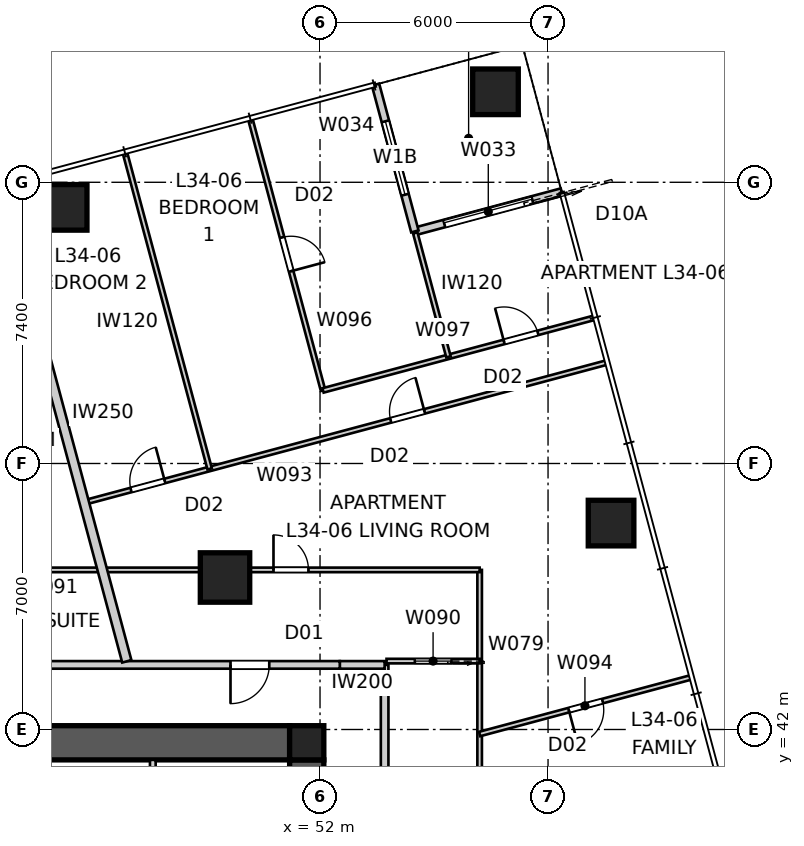
"""IFC4 building model, lengths in metres.
Left out: names, types, materials, properties, quantities, classifications, styles, units other than length and angle.
Written with IfcOpenShell. Run it as: python <this file> out.ifc"""

import sys

from ifc_helpers import new_model, si_unit, direction, frame, frame_2d, origin, origin_2d, place, context, subcontext, project, spatial, polyline, rectangle, outline, extrude, element, fill, save


model = new_model("IFC4")
c1 = context("Model", 3, precision=1e-05, world=origin(), true_north=direction((0.0, 1.0)))
c2 = subcontext(c1, "Body", "Model", "MODEL_VIEW")
j1 = project(units=[si_unit("LENGTHUNIT", "METRE"), si_unit("PLANEANGLEUNIT", "RADIAN")], contexts=[c1])
p1 = place(None, origin())
s1 = spatial("IfcSite", under=j1, at=p1, CompositionType="ELEMENT")
p2 = place(p1, origin())
s2 = spatial("IfcBuilding", under=s1, at=p2, CompositionType="ELEMENT")
p3 = place(p2, frame((0.0, 0.0, 125.2)))
s3 = spatial("IfcBuildingStorey", under=s2, at=p3, CompositionType="ELEMENT", Elevation=125.2)
p4 = place(p3, frame((28.8, 41.65, 0.0), z_axis=(0.0, 0.0, 1.0), x_axis=(1.0, 0.0, 0.0)))
e1 = element("IfcWall", 1, at=p4, inside=s3, PredefinedType="SHEAR", context=c2, shape_type="SweptSolid", body=[
    extrude(outline(polyline([(0.0, -0.45), (22.4, -0.45), (22.4, -0.025), (22.85, -0.025), (22.85, 0.025), (22.4, 0.025), (22.4, 0.45), (0.0, 0.45), (0.0, 0.025), (-0.45, 0.025), (-0.45, -0.025), (0.0, -0.025), (0.0, -0.45)])), origin(), (0.0, 0.0, 1.0), 3.4),
])
p5 = place(p3, frame((51.65, 18.8, 0.0), z_axis=(0.0, 0.0, 1.0), x_axis=(0.0, 1.0, 0.0)))
e2 = element("IfcWall", 2, at=p5, inside=s3, PredefinedType="SHEAR", context=c2, shape_type="SweptSolid", body=[
    extrude(outline(polyline([(0.0, -0.45), (22.4, -0.45), (22.4, -0.025), (22.85, -0.025), (22.85, 0.025), (22.4, 0.025), (22.4, 0.45), (0.0, 0.45), (0.0, 0.025), (-0.45, 0.025), (-0.45, -0.025), (0.0, -0.025), (0.0, -0.45)])), origin(), (0.0, 0.0, 1.0), 3.4),
])
p6 = place(p5, frame((11.14, 0.0, 0.0)))
e3 = element("IfcOpeningElement", 3, at=p6, cuts=e2, PredefinedType="OPENING", context=c2, shape_type="SweptSolid", body=[
    extrude(rectangle(XDim=1.02, YDim=2.4, at=frame_2d((0.51, 1.2))), frame((0.0, 0.46, 0.0), z_axis=(0.0, -1.0, 0.0), x_axis=(1.0, 0.0, 0.0)), (0.0, 0.0, 1.0), 0.92),
])
p7 = place(p3, frame((51.65, 41.65, 0.0), z_axis=(0.0, 0.0, 1.0), x_axis=(1.0, 0.0, 0.0)))
e4 = element("IfcColumn", 4, at=p7, inside=s3, PredefinedType="COLUMN", context=c2, shape_type="SweptSolid", body=[
    extrude(rectangle(XDim=0.9, YDim=0.9, at=origin_2d()), origin(), (0.0, 0.0, 1.0), 3.4),
])
for number, where, z_axis, x_axis in (
    (5, (59.658, 47.432, 0.0), (0.0, 0.0, 1.0), (1.0, 0.0, 0.0)),
    (6, (56.617, 58.781, 0.0), (0.0, 0.0, 1.0), (1.0, 0.0, 0.0)),
    (7, (45.267, 55.74, 0.0), (0.0, 0.0, 1.0), (1.0, 0.0, 0.0)),
):
    element("IfcColumn", number, at=place(p3, frame(where, z_axis=z_axis, x_axis=x_axis)), inside=s3, PredefinedType="COLUMN", context=c2, shape_type="SweptSolid", body=[
        extrude(rectangle(XDim=1.2, YDim=1.2, at=origin_2d()), origin(), (0.0, 0.0, 1.0), 3.4),
    ])
p8 = place(p3, frame((49.5, 46.0, 0.0), z_axis=(0.0, 0.0, 1.0), x_axis=(1.0, 0.0, 0.0)))
e8 = element("IfcColumn", 8, at=p8, inside=s3, PredefinedType="COLUMN", context=c2, shape_type="SweptSolid", body=[
    extrude(rectangle(XDim=1.3, YDim=1.3, at=origin_2d()), origin(), (0.0, 0.0, 1.0), 3.4),
])
p9 = place(p3, frame((58.359, 56.143, 0.0), z_axis=(0.0, 0.0, 1.0), x_axis=(-0.965919172068, -0.258843877716, 0.0)))
e9 = element("IfcWall", 9, at=p9, inside=s3, PredefinedType="SOLIDWALL", context=c2, shape_type="SweptSolid", body=[
    extrude(rectangle(XDim=4.0, YDim=0.2, at=frame_2d((2.0, 0.0))), origin(), (0.0, 0.0, 1.0), 3.25),
])
p10 = place(p9, frame((0.8, 0.0, 0.0)))
e10 = element("IfcOpeningElement", 10, at=p10, cuts=e9, PredefinedType="OPENING", context=c2, shape_type="SweptSolid", body=[
    extrude(rectangle(XDim=2.4, YDim=2.1, at=frame_2d((1.2, 1.05))), frame((0.0, 0.11, 0.0), z_axis=(0.0, -1.0, 0.0), x_axis=(1.0, 0.0, 0.0)), (0.0, 0.0, 1.0), 0.22),
])
p11 = place(p3, frame((54.496, 55.107, 0.0), z_axis=(0.0, 0.0, 1.0), x_axis=(-0.258786931944, 0.965934430412, 0.0)))
e11 = element("IfcWall", 11, at=p11, inside=s3, PredefinedType="SOLIDWALL", context=c2, shape_type="SweptSolid", body=[
    extrude(rectangle(XDim=4.0, YDim=0.2, at=frame_2d((2.0, 0.0))), origin(), (0.0, 0.0, 1.0), 3.25),
])
p12 = place(p11, frame((1.0, 0.0, 0.45)))
e12 = element("IfcOpeningElement", 12, at=p12, cuts=e11, PredefinedType="OPENING", context=c2, shape_type="SweptSolid", body=[
    extrude(rectangle(XDim=2.0, YDim=1.8, at=frame_2d((1.0, 0.9))), frame((0.0, 0.11, 0.0), z_axis=(0.0, -1.0, 0.0), x_axis=(1.0, 0.0, 0.0)), (0.0, 0.0, 1.0), 0.22),
])
p13 = place(p3, frame((53.7, 17.48, 0.0), z_axis=(0.0, 0.0, 1.0), x_axis=(0.0, 1.0, 0.0)))
e13 = element("IfcWall", 13, at=p13, inside=s3, PredefinedType="PARTITIONING", context=c2, shape_type="SweptSolid", body=[
    extrude(rectangle(XDim=26.22, YDim=0.2, at=frame_2d((13.11, 0.0))), origin(), (0.0, 0.0, 1.0), 3.25),
])
p14 = place(p13, frame((2.252, 0.0, 0.0)))
e14 = element("IfcOpeningElement", 14, at=p14, cuts=e13, PredefinedType="OPENING", context=c2, shape_type="SweptSolid", body=[
    extrude(rectangle(XDim=1.02, YDim=2.34, at=frame_2d((0.51, 1.17))), frame((0.0, 0.11, 0.0), z_axis=(0.0, -1.0, 0.0), x_axis=(1.0, 0.0, 0.0)), (0.0, 0.0, 1.0), 0.22),
])
p15 = place(p13, frame((7.328, 0.0, 0.0)))
e15 = element("IfcOpeningElement", 15, at=p15, cuts=e13, PredefinedType="OPENING", context=c2, shape_type="SweptSolid", body=[
    extrude(rectangle(XDim=1.02, YDim=2.34, at=frame_2d((0.51, 1.17))), frame((0.0, 0.11, 0.0), z_axis=(0.0, -1.0, 0.0), x_axis=(1.0, 0.0, 0.0)), (0.0, 0.0, 1.0), 0.22),
])
p16 = place(p3, frame((53.7, 43.7, 0.0), z_axis=(0.0, 0.0, 1.0), x_axis=(-1.0, 0.0, 0.0)))
e16 = element("IfcWall", 16, at=p16, inside=s3, PredefinedType="PARTITIONING", context=c2, shape_type="SweptSolid", body=[
    extrude(rectangle(XDim=1.18, YDim=0.2, at=frame_2d((0.59, 0.0))), origin(), (0.0, 0.0, 1.0), 2.722),
])
p17 = place(p3, frame((52.52, 43.7, 0.0), z_axis=(0.0, 0.0, 1.0), x_axis=(-1.0, 0.0, 0.0)))
e17 = element("IfcWall", 17, at=p17, inside=s3, PredefinedType="PARTITIONING", context=c2, shape_type="SweptSolid", body=[
    extrude(rectangle(XDim=27.02, YDim=0.2, at=frame_2d((13.51, 0.0))), origin(), (0.0, 0.0, 1.0), 3.25),
])
p18 = place(p17, frame((22.208, 0.0, 0.0)))
e18 = element("IfcOpeningElement", 18, at=p18, cuts=e17, PredefinedType="OPENING", context=c2, shape_type="SweptSolid", body=[
    extrude(rectangle(XDim=1.02, YDim=2.34, at=frame_2d((0.51, 1.17))), frame((0.0, 0.11, 0.0), z_axis=(0.0, -1.0, 0.0), x_axis=(1.0, 0.0, 0.0)), (0.0, 0.0, 1.0), 0.22),
])
p19 = place(p17, frame((1.856, 0.0, 0.0)))
e19 = element("IfcOpeningElement", 19, at=p19, cuts=e17, PredefinedType="OPENING", context=c2, shape_type="SweptSolid", body=[
    extrude(rectangle(XDim=1.02, YDim=2.34, at=frame_2d((0.51, 1.17))), frame((0.0, 0.11, 0.0), z_axis=(0.0, -1.0, 0.0), x_axis=(1.0, 0.0, 0.0)), (0.0, 0.0, 1.0), 0.22),
])
p20 = place(p3, frame((43.56, 56.318, 0.0), z_axis=(0.0, 0.0, 1.0), x_axis=(0.258822671559, -0.965924854576, 0.0)))
e20 = element("IfcWall", 20, at=p20, inside=s3, PredefinedType="PARTITIONING", context=c2, shape_type="SweptSolid", body=[
    extrude(rectangle(XDim=12.966, YDim=0.25, at=frame_2d((6.483, 0.0))), origin(), (0.0, 0.0, 1.0), 3.25),
])
p21 = place(p3, frame((47.6, 41.2, 0.0), z_axis=(0.0, 0.0, 1.0), x_axis=(0.0, -1.0, 0.0)))
e21 = element("IfcWall", 21, at=p21, inside=s3, PredefinedType="SOLIDWALL", context=c2, shape_type="SweptSolid", body=[
    extrude(rectangle(XDim=5.9, YDim=0.15, at=frame_2d((2.95, 0.0))), origin(), (0.0, 0.0, 1.0), 3.25),
])
p22 = place(p3, frame((56.2, 46.2, 0.0), z_axis=(0.0, 0.0, 1.0), x_axis=(0.0, -1.0, 0.0)))
e22 = element("IfcWall", 22, at=p22, inside=s3, PredefinedType="PARTITIONING", context=c2, shape_type="SweptSolid", body=[
    extrude(rectangle(XDim=33.2, YDim=0.12, at=frame_2d((16.6, 0.0))), origin(), (0.0, 0.0, 1.0), 2.55),
])
p23 = place(p22, frame((23.955, 0.0, 0.0)))
e23 = element("IfcOpeningElement", 23, at=p23, cuts=e22, PredefinedType="OPENING", context=c2, shape_type="SweptSolid", body=[
    extrude(rectangle(XDim=0.92, YDim=2.34, at=frame_2d((0.46, 1.17))), frame((0.0, 0.07, 0.0), z_axis=(0.0, -1.0, 0.0), x_axis=(1.0, 0.0, 0.0)), (0.0, 0.0, 1.0), 0.14),
])
p24 = place(p22, frame((20.966, 0.0, 0.0)))
e24 = element("IfcOpeningElement", 24, at=p24, cuts=e22, PredefinedType="OPENING", context=c2, shape_type="SweptSolid", body=[
    extrude(rectangle(XDim=0.92, YDim=2.34, at=frame_2d((0.46, 1.17))), frame((0.0, 0.07, 0.0), z_axis=(0.0, -1.0, 0.0), x_axis=(1.0, 0.0, 0.0)), (0.0, 0.0, 1.0), 0.14),
])
p25 = place(p22, frame((13.174, 0.0, 0.0)))
e25 = element("IfcOpeningElement", 25, at=p25, cuts=e22, PredefinedType="OPENING", context=c2, shape_type="SweptSolid", body=[
    extrude(rectangle(XDim=0.96, YDim=2.1, at=frame_2d((0.48, 1.05))), frame((0.0, 0.07, 0.0), z_axis=(0.0, -1.0, 0.0), x_axis=(1.0, 0.0, 0.0)), (0.0, 0.0, 1.0), 0.14),
])
p26 = place(p3, frame((56.2, 43.8, 0.0), z_axis=(0.0, 0.0, 1.0), x_axis=(-1.0, 0.0, 0.0)))
e26 = element("IfcWall", 26, at=p26, inside=s3, PredefinedType="PARTITIONING", context=c2, shape_type="SweptSolid", body=[
    extrude(rectangle(XDim=2.45, YDim=0.12, at=frame_2d((1.225, 0.0))), origin(), (0.0, 0.0, 1.0), 2.722),
])
p27 = place(p26, frame((0.745, 0.0, 0.0)))
e27 = element("IfcOpeningElement", 27, at=p27, cuts=e26, PredefinedType="OPENING", context=c2, shape_type="SweptSolid", body=[
    extrude(rectangle(XDim=0.96, YDim=2.1, at=frame_2d((0.48, 1.05))), frame((0.0, 0.07, 0.0), z_axis=(0.0, -1.0, 0.0), x_axis=(1.0, 0.0, 0.0)), (0.0, 0.0, 1.0), 0.14),
])
p28 = place(p3, frame((23.0, 46.2, 0.0), z_axis=(0.0, 0.0, 1.0), x_axis=(1.0, 0.0, 0.0)))
e28 = element("IfcWall", 28, at=p28, inside=s3, PredefinedType="PARTITIONING", context=c2, shape_type="SweptSolid", body=[
    extrude(rectangle(XDim=33.2, YDim=0.12, at=frame_2d((16.6, 0.0))), origin(), (0.0, 0.0, 1.0), 2.55),
])
p29 = place(p28, frame((5.844, 0.0, 0.0)))
e29 = element("IfcOpeningElement", 29, at=p29, cuts=e28, PredefinedType="OPENING", context=c2, shape_type="SweptSolid", body=[
    extrude(rectangle(XDim=0.92, YDim=2.34, at=frame_2d((0.46, 1.17))), frame((0.0, 0.07, 0.0), z_axis=(0.0, -1.0, 0.0), x_axis=(1.0, 0.0, 0.0)), (0.0, 0.0, 1.0), 0.14),
])
p30 = place(p28, frame((3.382, 0.0, 0.0)))
e30 = element("IfcOpeningElement", 30, at=p30, cuts=e28, PredefinedType="OPENING", context=c2, shape_type="SweptSolid", body=[
    extrude(rectangle(XDim=0.92, YDim=2.34, at=frame_2d((0.46, 1.17))), frame((0.0, 0.07, 0.0), z_axis=(0.0, -1.0, 0.0), x_axis=(1.0, 0.0, 0.0)), (0.0, 0.0, 1.0), 0.14),
])
p31 = place(p28, frame((9.452, 0.0, 0.0)))
e31 = element("IfcOpeningElement", 31, at=p31, cuts=e28, PredefinedType="OPENING", context=c2, shape_type="SweptSolid", body=[
    extrude(rectangle(XDim=0.92, YDim=2.34, at=frame_2d((0.46, 1.17))), frame((0.0, 0.07, 0.0), z_axis=(0.0, -1.0, 0.0), x_axis=(1.0, 0.0, 0.0)), (0.0, 0.0, 1.0), 0.14),
])
p32 = place(p28, frame((27.775, 0.0, 0.0)))
e32 = element("IfcOpeningElement", 32, at=p32, cuts=e28, PredefinedType="OPENING", context=c2, shape_type="SweptSolid", body=[
    extrude(rectangle(XDim=0.92, YDim=2.34, at=frame_2d((0.46, 1.17))), frame((0.0, 0.07, 0.0), z_axis=(0.0, -1.0, 0.0), x_axis=(1.0, 0.0, 0.0)), (0.0, 0.0, 1.0), 0.14),
])
p33 = place(p28, frame((15.05, 0.0, 0.0)))
e33 = element("IfcOpeningElement", 33, at=p33, cuts=e28, PredefinedType="OPENING", context=c2, shape_type="SweptSolid", body=[
    extrude(rectangle(XDim=0.96, YDim=2.1, at=frame_2d((0.48, 1.05))), frame((0.0, 0.07, 0.0), z_axis=(0.0, -1.0, 0.0), x_axis=(1.0, 0.0, 0.0)), (0.0, 0.0, 1.0), 0.14),
])
p34 = place(p3, frame((45.796, 47.973, 0.0), z_axis=(0.0, 0.0, 1.0), x_axis=(0.965921975889, 0.258833414564, 0.0)))
e34 = element("IfcWall", 34, at=p34, inside=s3, PredefinedType="PARTITIONING", context=c2, shape_type="SweptSolid", body=[
    extrude(rectangle(XDim=14.21, YDim=0.12, at=frame_2d((7.105, 0.0))), origin(), (0.0, 0.0, 1.0), 3.25),
])
p35 = place(p34, frame((8.348, 0.0, 0.0)))
e35 = element("IfcOpeningElement", 35, at=p35, cuts=e34, PredefinedType="OPENING", context=c2, shape_type="SweptSolid", body=[
    extrude(rectangle(XDim=0.92, YDim=2.34, at=frame_2d((0.46, 1.17))), frame((0.0, 0.07, 0.0), z_axis=(0.0, -1.0, 0.0), x_axis=(1.0, 0.0, 0.0)), (0.0, 0.0, 1.0), 0.14),
])
p36 = place(p34, frame((1.273, 0.0, 0.0)))
e36 = element("IfcOpeningElement", 36, at=p36, cuts=e34, PredefinedType="OPENING", context=c2, shape_type="SweptSolid", body=[
    extrude(rectangle(XDim=0.92, YDim=2.34, at=frame_2d((0.46, 1.17))), frame((0.0, 0.07, 0.0), z_axis=(0.0, -1.0, 0.0), x_axis=(1.0, 0.0, 0.0)), (0.0, 0.0, 1.0), 0.14),
])
p37 = place(p3, frame((61.741, 43.366, 0.0), z_axis=(0.0, 0.0, 1.0), x_axis=(-0.965924876974, -0.25882258797, 0.0)))
e37 = element("IfcWall", 37, at=p37, inside=s3, PredefinedType="PARTITIONING", context=c2, shape_type="SweptSolid", body=[
    extrude(rectangle(XDim=5.737, YDim=0.12, at=frame_2d((2.869, 0.0))), origin(), (0.0, 0.0, 1.0), 3.25),
])
p38 = place(p37, frame((2.388, 0.0, 0.0)))
e38 = element("IfcOpeningElement", 38, at=p38, cuts=e37, PredefinedType="OPENING", context=c2, shape_type="SweptSolid", body=[
    extrude(rectangle(XDim=0.92, YDim=2.34, at=frame_2d((0.46, 1.17))), frame((0.0, 0.07, 0.0), z_axis=(0.0, -1.0, 0.0), x_axis=(1.0, 0.0, 0.0)), (0.0, 0.0, 1.0), 0.14),
])
p39 = place(p3, frame((49.096, 48.857, 0.0), z_axis=(0.0, 0.0, 1.0), x_axis=(-0.258800415469, 0.965930817892, 0.0)))
e39 = element("IfcWall", 39, at=p39, inside=s3, PredefinedType="PARTITIONING", context=c2, shape_type="SweptSolid", body=[
    extrude(rectangle(XDim=8.6, YDim=0.12, at=frame_2d((4.3, 0.0))), origin(), (0.0, 0.0, 1.0), 2.722),
])
p40 = place(p3, frame((50.17, 58.048, 0.0), z_axis=(0.0, 0.0, 1.0), x_axis=(0.258807770359, -0.965928847277, 0.0)))
e40 = element("IfcWall", 40, at=p40, inside=s3, PredefinedType="PARTITIONING", context=c2, shape_type="SweptSolid", body=[
    extrude(rectangle(XDim=7.377, YDim=0.12, at=frame_2d((3.688, 0.0))), origin(), (0.0, 0.0, 1.0), 3.25),
])
p41 = place(p40, frame((3.208, 0.0, 0.0)))
e41 = element("IfcOpeningElement", 41, at=p41, cuts=e40, PredefinedType="OPENING", context=c2, shape_type="SweptSolid", body=[
    extrude(rectangle(XDim=0.92, YDim=2.34, at=frame_2d((0.46, 1.17))), frame((0.0, 0.07, 0.0), z_axis=(0.0, -1.0, 0.0), x_axis=(1.0, 0.0, 0.0)), (0.0, 0.0, 1.0), 0.14),
])
p42 = place(p3, frame((52.08, 50.923, 0.0), z_axis=(0.0, 0.0, 1.0), x_axis=(0.965920573283, 0.258838648792, 0.0)))
e42 = element("IfcWall", 42, at=p42, inside=s3, PredefinedType="PARTITIONING", context=c2, shape_type="SweptSolid", body=[
    extrude(rectangle(XDim=7.377, YDim=0.12, at=frame_2d((3.688, 0.0))), origin(), (0.0, 0.0, 1.0), 3.25),
])
p43 = place(p42, frame((4.932, 0.0, 0.0)))
e43 = element("IfcOpeningElement", 43, at=p43, cuts=e42, PredefinedType="OPENING", context=c2, shape_type="SweptSolid", body=[
    extrude(rectangle(XDim=0.92, YDim=2.34, at=frame_2d((0.46, 1.17))), frame((0.0, 0.07, 0.0), z_axis=(0.0, -1.0, 0.0), x_axis=(1.0, 0.0, 0.0)), (0.0, 0.0, 1.0), 0.14),
])
p44 = place(p3, frame((54.506, 55.069, 0.0), z_axis=(0.0, 0.0, 1.0), x_axis=(0.258783069815, -0.96593546512, 0.0)))
e44 = element("IfcWall", 44, at=p44, inside=s3, PredefinedType="PARTITIONING", context=c2, shape_type="SweptSolid", body=[
    extrude(rectangle(XDim=3.376, YDim=0.12, at=frame_2d((1.688, 0.0))), origin(), (0.0, 0.0, 1.0), 3.25),
])
p45 = place(p10, origin())
e45 = element("IfcDoor", 45, at=p45, inside=s3, OperationType="SLIDING_TO_LEFT", PredefinedType="DOOR", context=c2, shape_type="SweptSolid", body=[
    extrude(rectangle(XDim=2.4, YDim=2.1, at=frame_2d((1.2, 1.05))), frame((0.0, 0.025, 0.0), z_axis=(0.0, -1.0, 0.0), x_axis=(1.0, 0.0, 0.0)), (0.0, 0.0, 1.0), 0.05),
])
fill(e10, e45)
p46 = place(p12, origin())
e46 = element("IfcWindow", 46, at=p46, inside=s3, PartitioningType="SINGLE_PANEL", PredefinedType="WINDOW", context=c2, shape_type="SweptSolid", body=[
    extrude(rectangle(XDim=2.0, YDim=1.8, at=frame_2d((1.0, 0.9))), frame((0.0, 0.03, 0.0), z_axis=(0.0, -1.0, 0.0), x_axis=(1.0, 0.0, 0.0)), (0.0, 0.0, 1.0), 0.06),
])
fill(e12, e46)
p47 = place(p19, origin())
e47 = element("IfcDoor", 47, at=p47, inside=s3, OperationType="SINGLE_SWING_RIGHT", PredefinedType="DOOR", context=c2, shape_type="SweptSolid", body=[
    extrude(rectangle(XDim=1.02, YDim=2.34, at=frame_2d((0.51, 1.17))), frame((0.0, 0.025, 0.0), z_axis=(0.0, -1.0, 0.0), x_axis=(1.0, 0.0, 0.0)), (0.0, 0.0, 1.0), 0.05),
])
fill(e19, e47)
p48 = place(p32, origin())
e48 = element("IfcDoor", 48, at=p48, inside=s3, OperationType="SINGLE_SWING_LEFT", PredefinedType="DOOR", context=c2, shape_type="SweptSolid", body=[
    extrude(rectangle(XDim=0.92, YDim=2.34, at=frame_2d((0.46, 1.17))), frame((0.0, 0.025, 0.0), z_axis=(0.0, -1.0, 0.0), x_axis=(1.0, 0.0, 0.0)), (0.0, 0.0, 1.0), 0.05),
])
fill(e32, e48)
p49 = place(p27, origin())
e49 = element("IfcDoor", 49, at=p49, inside=s3, OperationType="SLIDING_TO_LEFT", PredefinedType="DOOR", context=c2, shape_type="SweptSolid", body=[
    extrude(rectangle(XDim=0.96, YDim=2.1, at=frame_2d((0.48, 1.05))), frame((0.0, 0.025, 0.0), z_axis=(0.0, -1.0, 0.0), x_axis=(1.0, 0.0, 0.0)), (0.0, 0.0, 1.0), 0.05),
])
fill(e27, e49)
p50 = place(p35, origin())
e50 = element("IfcDoor", 50, at=p50, inside=s3, OperationType="SINGLE_SWING_RIGHT", PredefinedType="DOOR", context=c2, shape_type="SweptSolid", body=[
    extrude(rectangle(XDim=0.92, YDim=2.34, at=frame_2d((0.46, 1.17))), frame((0.0, 0.025, 0.0), z_axis=(0.0, -1.0, 0.0), x_axis=(1.0, 0.0, 0.0)), (0.0, 0.0, 1.0), 0.05),
])
fill(e35, e50)
p51 = place(p38, origin())
e51 = element("IfcDoor", 51, at=p51, inside=s3, OperationType="SINGLE_SWING_RIGHT", PredefinedType="DOOR", context=c2, shape_type="SweptSolid", body=[
    extrude(rectangle(XDim=0.92, YDim=2.34, at=frame_2d((0.46, 1.17))), frame((0.0, 0.025, 0.0), z_axis=(0.0, -1.0, 0.0), x_axis=(1.0, 0.0, 0.0)), (0.0, 0.0, 1.0), 0.05),
])
fill(e38, e51)
p52 = place(p36, origin())
e52 = element("IfcDoor", 52, at=p52, inside=s3, OperationType="SINGLE_SWING_RIGHT", PredefinedType="DOOR", context=c2, shape_type="SweptSolid", body=[
    extrude(rectangle(XDim=0.92, YDim=2.34, at=frame_2d((0.46, 1.17))), frame((0.0, 0.025, 0.0), z_axis=(0.0, -1.0, 0.0), x_axis=(1.0, 0.0, 0.0)), (0.0, 0.0, 1.0), 0.05),
])
fill(e36, e52)
p53 = place(p41, origin())
e53 = element("IfcDoor", 53, at=p53, inside=s3, OperationType="SINGLE_SWING_RIGHT", PredefinedType="DOOR", context=c2, shape_type="SweptSolid", body=[
    extrude(rectangle(XDim=0.92, YDim=2.34, at=frame_2d((0.46, 1.17))), frame((0.0, 0.025, 0.0), z_axis=(0.0, -1.0, 0.0), x_axis=(1.0, 0.0, 0.0)), (0.0, 0.0, 1.0), 0.05),
])
fill(e41, e53)
p54 = place(p43, origin())
e54 = element("IfcDoor", 54, at=p54, inside=s3, OperationType="SINGLE_SWING_LEFT", PredefinedType="DOOR", context=c2, shape_type="SweptSolid", body=[
    extrude(rectangle(XDim=0.92, YDim=2.34, at=frame_2d((0.46, 1.17))), frame((0.0, 0.025, 0.0), z_axis=(0.0, -1.0, 0.0), x_axis=(1.0, 0.0, 0.0)), (0.0, 0.0, 1.0), 0.05),
])
fill(e43, e54)
save(model, sys.argv[1])
